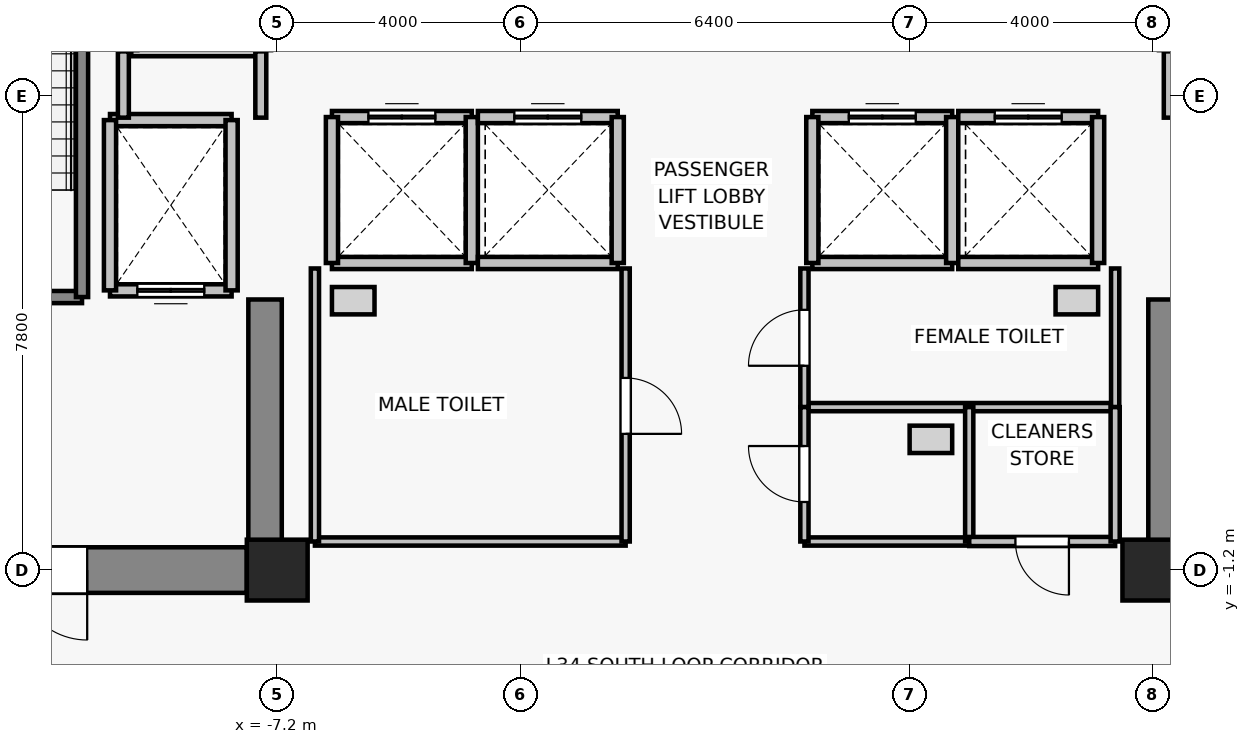
"""IFC4 building model, lengths in metres.
Left out: names, types, materials, properties, quantities, classifications, styles, units other than length and angle.
Written with IfcOpenShell. Run it as: python <this file> out.ifc"""

import sys

from ifc_helpers import new_model, si_unit, direction, frame, frame_2d, origin, origin_2d, place, context, subcontext, project, spatial, rectangle, extrude, source, transform, mapped, element, fill, save


model = new_model("IFC4")
c1 = context("Model", 3, precision=1e-05, world=origin(), true_north=direction((0.0, 1.0)))
c2 = subcontext(c1, "Body", "Model", "MODEL_VIEW")
j1 = project(units=[si_unit("LENGTHUNIT", "METRE"), si_unit("PLANEANGLEUNIT", "RADIAN")], contexts=[c1])
p1 = place(None, origin())
s1 = spatial("IfcSite", under=j1, at=p1, CompositionType="ELEMENT")
p2 = place(p1, origin())
s2 = spatial("IfcBuilding", under=s1, at=p2, CompositionType="ELEMENT")
p3 = place(p2, frame((0.0, 0.0, 123.1)))
s3 = spatial("IfcBuildingStorey", under=s2, at=p3, CompositionType="ELEMENT", Elevation=123.1)
for number, where, z_axis, x_axis in (
    (1, (-7.2, -1.2, 0.0), (0.0, 0.0, 1.0), (1.0, 0.0, 0.0)),
    (2, (7.2, -1.2, 0.0), (0.0, 0.0, 1.0), (1.0, 0.0, 0.0)),
):
    element("IfcColumn", number, at=place(p3, frame(where, z_axis=z_axis, x_axis=x_axis)), inside=s3, PredefinedType="COLUMN", context=c2, shape_type="SweptSolid", body=[
        extrude(rectangle(XDim=1.0, YDim=1.0, at=origin_2d()), origin(), (0.0, 0.0, 1.0), 3.3),
    ])
p4 = place(p3, frame((-7.7, -1.2, 0.0), z_axis=(0.0, 0.0, 1.0), x_axis=(-1.0, 0.0, 0.0)))
e3 = element("IfcWall", 3, at=p4, inside=s3, PredefinedType="SHEAR", context=c2, shape_type="SweptSolid", body=[
    extrude(rectangle(XDim=6.2, YDim=0.75, at=frame_2d((3.1, 0.0))), origin(), (0.0, 0.0, 1.0), 3.075),
])
p5 = place(p4, frame((2.625, 0.0, 0.0)))
e4 = element("IfcOpeningElement", 4, at=p5, cuts=e3, PredefinedType="OPENING", context=c2, shape_type="SweptSolid", body=[
    extrude(rectangle(XDim=1.15, YDim=2.15, at=frame_2d((0.575, 1.075))), frame((0.0, 0.385, 0.0), z_axis=(0.0, -1.0, 0.0), x_axis=(1.0, 0.0, 0.0)), (0.0, 0.0, 1.0), 0.77),
])
for number, where, z_axis, x_axis in (
    (5, (-7.4, -0.825, 0.0), (0.0, 0.0, 1.0), (0.0, 1.0, 0.0)),
    (6, (7.4, -0.825, 0.0), (0.0, 0.0, 1.0), (0.0, 1.0, 0.0)),
):
    element("IfcWall", number, at=place(p3, frame(where, z_axis=z_axis, x_axis=x_axis)), inside=s3, PredefinedType="SHEAR", context=c2, shape_type="SweptSolid", body=[
        extrude(rectangle(XDim=4.075, YDim=0.55, at=frame_2d((2.038, 0.0))), origin(), (0.0, 0.0, 1.0), 3.075),
    ])
p6 = place(p3, frame((-7.95, 3.4, 0.0), z_axis=(0.0, 0.0, 1.0), x_axis=(-1.0, 0.0, 0.0)))
e7 = element("IfcWall", 7, at=p6, inside=s3, PredefinedType="SOLIDWALL", context=c2, shape_type="SweptSolid", body=[
    extrude(rectangle(XDim=2.0, YDim=0.2, at=frame_2d((1.0, 0.0))), origin(), (0.0, 0.0, 1.0), 3.075),
])
p7 = place(p6, frame((0.45, 0.0, 0.0)))
e8 = element("IfcOpeningElement", 8, at=p7, cuts=e7, PredefinedType="OPENING", context=c2, shape_type="SweptSolid", body=[
    extrude(rectangle(XDim=1.1, YDim=2.2, at=frame_2d((0.55, 1.1))), frame((0.0, 0.11, 0.0), z_axis=(0.0, -1.0, 0.0), x_axis=(1.0, 0.0, 0.0)), (0.0, 0.0, 1.0), 0.22),
])
p8 = place(p3, frame((-9.95, 6.2, 0.0), z_axis=(0.0, 0.0, 1.0), x_axis=(1.0, 0.0, 0.0)))
e9 = element("IfcWall", 9, at=p8, inside=s3, PredefinedType="SOLIDWALL", context=c2, shape_type="SweptSolid", body=[
    extrude(rectangle(XDim=2.0, YDim=0.2, at=frame_2d((1.0, 0.0))), origin(), (0.0, 0.0, 1.0), 3.075),
])
for number, where, z_axis, x_axis in (
    (10, (-9.95, 3.4, 0.0), (0.0, 0.0, 1.0), (0.0, 1.0, 0.0)),
    (11, (-7.95, 6.2, 0.0), (0.0, 0.0, 1.0), (0.0, -1.0, 0.0)),
):
    element("IfcWall", number, at=place(p3, frame(where, z_axis=z_axis, x_axis=x_axis)), inside=s3, PredefinedType="SOLIDWALL", context=c2, shape_type="SweptSolid", body=[
        extrude(rectangle(XDim=2.8, YDim=0.2, at=frame_2d((1.4, 0.0))), origin(), (0.0, 0.0, 1.0), 3.075),
    ])
p9 = place(p3, frame((-4.0, 3.85, 0.0), z_axis=(0.0, 0.0, 1.0), x_axis=(-1.0, 0.0, 0.0)))
e12 = element("IfcWall", 12, at=p9, inside=s3, PredefinedType="SOLIDWALL", context=c2, shape_type="SweptSolid", body=[
    extrude(rectangle(XDim=2.3, YDim=0.2, at=frame_2d((1.15, 0.0))), origin(), (0.0, 0.0, 1.0), 3.075),
])
p10 = place(p3, frame((-6.3, 6.25, 0.0), z_axis=(0.0, 0.0, 1.0), x_axis=(1.0, 0.0, 0.0)))
e13 = element("IfcWall", 13, at=p10, inside=s3, PredefinedType="SOLIDWALL", context=c2, shape_type="SweptSolid", body=[
    extrude(rectangle(XDim=2.3, YDim=0.2, at=frame_2d((1.15, 0.0))), origin(), (0.0, 0.0, 1.0), 3.075),
])
p11 = place(p10, frame((0.6, 0.0, 0.0)))
e14 = element("IfcOpeningElement", 14, at=p11, cuts=e13, PredefinedType="OPENING", context=c2, shape_type="SweptSolid", body=[
    extrude(rectangle(XDim=1.1, YDim=2.2, at=frame_2d((0.55, 1.1))), frame((0.0, 0.11, 0.0), z_axis=(0.0, -1.0, 0.0), x_axis=(1.0, 0.0, 0.0)), (0.0, 0.0, 1.0), 0.22),
])
for number, where, z_axis, x_axis in (
    (15, (-6.3, 3.85, 0.0), (0.0, 0.0, 1.0), (0.0, 1.0, 0.0)),
    (16, (-4.0, 6.25, 0.0), (0.0, 0.0, 1.0), (0.0, -1.0, 0.0)),
):
    element("IfcWall", number, at=place(p3, frame(where, z_axis=z_axis, x_axis=x_axis)), inside=s3, PredefinedType="SOLIDWALL", context=c2, shape_type="SweptSolid", body=[
        extrude(rectangle(XDim=2.4, YDim=0.2, at=frame_2d((1.2, 0.0))), origin(), (0.0, 0.0, 1.0), 3.075),
    ])
p12 = place(p3, frame((-1.6, 3.85, 0.0), z_axis=(0.0, 0.0, 1.0), x_axis=(-1.0, 0.0, 0.0)))
e17 = element("IfcWall", 17, at=p12, inside=s3, PredefinedType="SOLIDWALL", context=c2, shape_type="SweptSolid", body=[
    extrude(rectangle(XDim=2.3, YDim=0.2, at=frame_2d((1.15, 0.0))), origin(), (0.0, 0.0, 1.0), 3.075),
])
p13 = place(p3, frame((-3.9, 6.25, 0.0), z_axis=(0.0, 0.0, 1.0), x_axis=(1.0, 0.0, 0.0)))
e18 = element("IfcWall", 18, at=p13, inside=s3, PredefinedType="SOLIDWALL", context=c2, shape_type="SweptSolid", body=[
    extrude(rectangle(XDim=2.3, YDim=0.2, at=frame_2d((1.15, 0.0))), origin(), (0.0, 0.0, 1.0), 3.075),
])
p14 = place(p13, frame((0.6, 0.0, 0.0)))
e19 = element("IfcOpeningElement", 19, at=p14, cuts=e18, PredefinedType="OPENING", context=c2, shape_type="SweptSolid", body=[
    extrude(rectangle(XDim=1.1, YDim=2.2, at=frame_2d((0.55, 1.1))), frame((0.0, 0.11, 0.0), z_axis=(0.0, -1.0, 0.0), x_axis=(1.0, 0.0, 0.0)), (0.0, 0.0, 1.0), 0.22),
])
p15 = place(p3, frame((-1.6, 6.25, 0.0), z_axis=(0.0, 0.0, 1.0), x_axis=(0.0, -1.0, 0.0)))
e20 = element("IfcWall", 20, at=p15, inside=s3, PredefinedType="SOLIDWALL", context=c2, shape_type="SweptSolid", body=[
    extrude(rectangle(XDim=2.4, YDim=0.2, at=frame_2d((1.2, 0.0))), origin(), (0.0, 0.0, 1.0), 3.075),
])
p16 = place(p3, frame((3.9, 3.85, 0.0), z_axis=(0.0, 0.0, 1.0), x_axis=(-1.0, 0.0, 0.0)))
e21 = element("IfcWall", 21, at=p16, inside=s3, PredefinedType="SOLIDWALL", context=c2, shape_type="SweptSolid", body=[
    extrude(rectangle(XDim=2.3, YDim=0.2, at=frame_2d((1.15, 0.0))), origin(), (0.0, 0.0, 1.0), 3.075),
])
p17 = place(p3, frame((1.6, 6.25, 0.0), z_axis=(0.0, 0.0, 1.0), x_axis=(1.0, 0.0, 0.0)))
e22 = element("IfcWall", 22, at=p17, inside=s3, PredefinedType="SOLIDWALL", context=c2, shape_type="SweptSolid", body=[
    extrude(rectangle(XDim=2.3, YDim=0.2, at=frame_2d((1.15, 0.0))), origin(), (0.0, 0.0, 1.0), 3.075),
])
p18 = place(p17, frame((0.6, 0.0, 0.0)))
e23 = element("IfcOpeningElement", 23, at=p18, cuts=e22, PredefinedType="OPENING", context=c2, shape_type="SweptSolid", body=[
    extrude(rectangle(XDim=1.1, YDim=2.2, at=frame_2d((0.55, 1.1))), frame((0.0, 0.11, 0.0), z_axis=(0.0, -1.0, 0.0), x_axis=(1.0, 0.0, 0.0)), (0.0, 0.0, 1.0), 0.22),
])
for number, where, z_axis, x_axis in (
    (24, (1.6, 3.85, 0.0), (0.0, 0.0, 1.0), (0.0, 1.0, 0.0)),
    (25, (3.9, 6.25, 0.0), (0.0, 0.0, 1.0), (0.0, -1.0, 0.0)),
):
    element("IfcWall", number, at=place(p3, frame(where, z_axis=z_axis, x_axis=x_axis)), inside=s3, PredefinedType="SOLIDWALL", context=c2, shape_type="SweptSolid", body=[
        extrude(rectangle(XDim=2.4, YDim=0.2, at=frame_2d((1.2, 0.0))), origin(), (0.0, 0.0, 1.0), 3.075),
    ])
p19 = place(p3, frame((6.3, 3.85, 0.0), z_axis=(0.0, 0.0, 1.0), x_axis=(-1.0, 0.0, 0.0)))
e26 = element("IfcWall", 26, at=p19, inside=s3, PredefinedType="SOLIDWALL", context=c2, shape_type="SweptSolid", body=[
    extrude(rectangle(XDim=2.3, YDim=0.2, at=frame_2d((1.15, 0.0))), origin(), (0.0, 0.0, 1.0), 3.075),
])
p20 = place(p3, frame((4.0, 6.25, 0.0), z_axis=(0.0, 0.0, 1.0), x_axis=(1.0, 0.0, 0.0)))
e27 = element("IfcWall", 27, at=p20, inside=s3, PredefinedType="SOLIDWALL", context=c2, shape_type="SweptSolid", body=[
    extrude(rectangle(XDim=2.3, YDim=0.2, at=frame_2d((1.15, 0.0))), origin(), (0.0, 0.0, 1.0), 3.075),
])
p21 = place(p20, frame((0.6, 0.0, 0.0)))
e28 = element("IfcOpeningElement", 28, at=p21, cuts=e27, PredefinedType="OPENING", context=c2, shape_type="SweptSolid", body=[
    extrude(rectangle(XDim=1.1, YDim=2.2, at=frame_2d((0.55, 1.1))), frame((0.0, 0.11, 0.0), z_axis=(0.0, -1.0, 0.0), x_axis=(1.0, 0.0, 0.0)), (0.0, 0.0, 1.0), 0.22),
])
p22 = place(p3, frame((6.3, 6.25, 0.0), z_axis=(0.0, 0.0, 1.0), x_axis=(0.0, -1.0, 0.0)))
e29 = element("IfcWall", 29, at=p22, inside=s3, PredefinedType="SOLIDWALL", context=c2, shape_type="SweptSolid", body=[
    extrude(rectangle(XDim=2.4, YDim=0.2, at=frame_2d((1.2, 0.0))), origin(), (0.0, 0.0, 1.0), 3.075),
])
for number, where, z_axis, x_axis in (
    (30, (-7.4, 7.35, 0.0), (0.0, 0.0, 1.0), (-1.0, 0.0, 0.0)),
    (31, (9.6, 7.35, 0.0), (0.0, 0.0, 1.0), (-1.0, 0.0, 0.0)),
):
    element("IfcWall", number, at=place(p3, frame(where, z_axis=z_axis, x_axis=x_axis)), inside=s3, PredefinedType="SOLIDWALL", context=c2, shape_type="SweptSolid", body=[
        extrude(rectangle(XDim=2.2, YDim=0.2, at=frame_2d((1.1, 0.0))), origin(), (0.0, 0.0, 1.0), 2.515),
    ])
p23 = place(p3, frame((-10.41, 3.29, 0.0), z_axis=(0.0, 0.0, 1.0), x_axis=(-1.0, 0.0, 0.0)))
e32 = element("IfcWall", 32, at=p23, inside=s3, PredefinedType="SOLIDWALL", context=c2, shape_type="SweptSolid", body=[
    extrude(rectangle(XDim=3.52, YDim=0.2, at=frame_2d((1.76, 0.0))), origin(), (0.0, 0.0, 1.0), 3.075),
])
p24 = place(p23, frame((1.165, 0.0, 0.0)))
e33 = element("IfcOpeningElement", 33, at=p24, cuts=e32, PredefinedType="OPENING", context=c2, shape_type="SweptSolid", body=[
    extrude(rectangle(XDim=1.15, YDim=2.15, at=frame_2d((0.575, 1.075))), frame((0.0, 0.11, 0.0), z_axis=(0.0, -1.0, 0.0), x_axis=(1.0, 0.0, 0.0)), (0.0, 0.0, 1.0), 0.22),
])
p25 = place(p3, frame((-10.41, 12.13, 0.0), z_axis=(0.0, 0.0, 1.0), x_axis=(0.0, -1.0, 0.0)))
e34 = element("IfcWall", 34, at=p25, inside=s3, PredefinedType="SOLIDWALL", context=c2, shape_type="SweptSolid", body=[
    extrude(rectangle(XDim=8.84, YDim=0.2, at=frame_2d((4.42, 0.0))), origin(), (0.0, 0.0, 1.0), 3.075),
])
p26 = place(p3, frame((-9.73, 6.24, 0.0), z_axis=(0.0, 0.0, 1.0), x_axis=(0.0, 1.0, 0.0)))
e35 = element("IfcWall", 35, at=p26, inside=s3, PredefinedType="PARTITIONING", context=c2, shape_type="SweptSolid", body=[
    extrude(rectangle(XDim=1.09, YDim=0.18, at=frame_2d((0.545, 0.0))), origin(), (0.0, 0.0, 1.0), 3.075),
])
for number, where, z_axis, x_axis in (
    (36, (-7.47, 7.33, 0.0), (0.0, 0.0, 1.0), (0.0, -1.0, 0.0)),
    (37, (7.47, 6.24, 0.0), (0.0, 0.0, 1.0), (0.0, 1.0, 0.0)),
):
    element("IfcWall", number, at=place(p3, frame(where, z_axis=z_axis, x_axis=x_axis)), inside=s3, PredefinedType="PARTITIONING", context=c2, shape_type="SweptSolid", body=[
        extrude(rectangle(XDim=1.09, YDim=0.18, at=frame_2d((0.545, 0.0))), origin(), (0.0, 0.0, 1.0), 2.515),
    ])
p27 = place(p3, frame((-1.47, -0.73, 0.0), z_axis=(0.0, 0.0, 1.0), x_axis=(-1.0, 0.0, 0.0)))
e38 = element("IfcWall", 38, at=p27, inside=s3, PredefinedType="PARTITIONING", context=c2, shape_type="SweptSolid", body=[
    extrude(rectangle(XDim=5.11, YDim=0.135, at=frame_2d((2.555, 0.0))), origin(), (0.0, 0.0, 1.0), 3.075),
])
p28 = place(p3, frame((-6.58, -0.73, 0.0), z_axis=(0.0, 0.0, 1.0), x_axis=(0.0, 1.0, 0.0)))
e39 = element("IfcWall", 39, at=p28, inside=s3, PredefinedType="PARTITIONING", context=c2, shape_type="SweptSolid", body=[
    extrude(rectangle(XDim=4.49, YDim=0.135, at=frame_2d((2.245, 0.0))), origin(), (0.0, 0.0, 1.0), 3.075),
])
p29 = place(p3, frame((-1.47, 3.76, 0.0), z_axis=(0.0, 0.0, 1.0), x_axis=(0.0, -1.0, 0.0)))
e40 = element("IfcWall", 40, at=p29, inside=s3, PredefinedType="PARTITIONING", context=c2, shape_type="SweptSolid", body=[
    extrude(rectangle(XDim=4.49, YDim=0.135, at=frame_2d((2.245, 0.0))), origin(), (0.0, 0.0, 1.0), 3.075),
])
p30 = place(p29, frame((1.8, 0.0, 0.0)))
e41 = element("IfcOpeningElement", 41, at=p30, cuts=e40, PredefinedType="OPENING", context=c2, shape_type="SweptSolid", body=[
    extrude(rectangle(XDim=0.92, YDim=2.1, at=frame_2d((0.46, 1.05))), frame((0.0, 0.077, 0.0), z_axis=(0.0, -1.0, 0.0), x_axis=(1.0, 0.0, 0.0)), (0.0, 0.0, 1.0), 0.155),
])
p31 = place(p3, frame((6.58, 1.48, 0.0), z_axis=(0.0, 0.0, 1.0), x_axis=(-1.0, 0.0, 0.0)))
e42 = element("IfcWall", 42, at=p31, inside=s3, PredefinedType="PARTITIONING", context=c2, shape_type="SweptSolid", body=[
    extrude(rectangle(XDim=5.11, YDim=0.135, at=frame_2d((2.555, 0.0))), origin(), (0.0, 0.0, 1.0), 3.075),
])
p32 = place(p3, frame((1.47, 1.48, 0.0), z_axis=(0.0, 0.0, 1.0), x_axis=(0.0, 1.0, 0.0)))
e43 = element("IfcWall", 43, at=p32, inside=s3, PredefinedType="PARTITIONING", context=c2, shape_type="SweptSolid", body=[
    extrude(rectangle(XDim=2.28, YDim=0.135, at=frame_2d((1.14, 0.0))), origin(), (0.0, 0.0, 1.0), 3.075),
])
p33 = place(p32, frame((0.68, 0.0, 0.0)))
e44 = element("IfcOpeningElement", 44, at=p33, cuts=e43, PredefinedType="OPENING", context=c2, shape_type="SweptSolid", body=[
    extrude(rectangle(XDim=0.92, YDim=2.1, at=frame_2d((0.46, 1.05))), frame((0.0, 0.077, 0.0), z_axis=(0.0, -1.0, 0.0), x_axis=(1.0, 0.0, 0.0)), (0.0, 0.0, 1.0), 0.155),
])
p34 = place(p3, frame((6.58, 3.76, 0.0), z_axis=(0.0, 0.0, 1.0), x_axis=(0.0, -1.0, 0.0)))
e45 = element("IfcWall", 45, at=p34, inside=s3, PredefinedType="PARTITIONING", context=c2, shape_type="SweptSolid", body=[
    extrude(rectangle(XDim=2.28, YDim=0.135, at=frame_2d((1.14, 0.0))), origin(), (0.0, 0.0, 1.0), 3.075),
])
p35 = place(p3, frame((4.18, -0.73, 0.0), z_axis=(0.0, 0.0, 1.0), x_axis=(-1.0, 0.0, 0.0)))
e46 = element("IfcWall", 46, at=p35, inside=s3, PredefinedType="PARTITIONING", context=c2, shape_type="SweptSolid", body=[
    extrude(rectangle(XDim=2.71, YDim=0.135, at=frame_2d((1.355, 0.0))), origin(), (0.0, 0.0, 1.0), 3.075),
])
p36 = place(p3, frame((1.47, -0.73, 0.0), z_axis=(0.0, 0.0, 1.0), x_axis=(0.0, 1.0, 0.0)))
e47 = element("IfcWall", 47, at=p36, inside=s3, PredefinedType="PARTITIONING", context=c2, shape_type="SweptSolid", body=[
    extrude(rectangle(XDim=2.21, YDim=0.135, at=frame_2d((1.105, 0.0))), origin(), (0.0, 0.0, 1.0), 3.075),
])
p37 = place(p36, frame((0.65, 0.0, 0.0)))
e48 = element("IfcOpeningElement", 48, at=p37, cuts=e47, PredefinedType="OPENING", context=c2, shape_type="SweptSolid", body=[
    extrude(rectangle(XDim=0.92, YDim=2.1, at=frame_2d((0.46, 1.05))), frame((0.0, 0.077, 0.0), z_axis=(0.0, -1.0, 0.0), x_axis=(1.0, 0.0, 0.0)), (0.0, 0.0, 1.0), 0.155),
])
p38 = place(p3, frame((4.18, 1.48, 0.0), z_axis=(0.0, 0.0, 1.0), x_axis=(0.0, -1.0, 0.0)))
e49 = element("IfcWall", 49, at=p38, inside=s3, PredefinedType="PARTITIONING", context=c2, shape_type="SweptSolid", body=[
    extrude(rectangle(XDim=2.21, YDim=0.135, at=frame_2d((1.105, 0.0))), origin(), (0.0, 0.0, 1.0), 3.075),
])
p39 = place(p3, frame((6.58, -0.73, 0.0), z_axis=(0.0, 0.0, 1.0), x_axis=(-1.0, 0.0, 0.0)))
e50 = element("IfcWall", 50, at=p39, inside=s3, PredefinedType="PARTITIONING", context=c2, shape_type="SweptSolid", body=[
    extrude(rectangle(XDim=2.4, YDim=0.15, at=frame_2d((1.2, 0.0))), origin(), (0.0, 0.0, 1.0), 3.075),
])
p40 = place(p39, frame((0.76, 0.0, 0.0)))
e51 = element("IfcOpeningElement", 51, at=p40, cuts=e50, PredefinedType="OPENING", context=c2, shape_type="SweptSolid", body=[
    extrude(rectangle(XDim=0.88, YDim=2.1, at=frame_2d((0.44, 1.05))), frame((0.0, 0.085, 0.0), z_axis=(0.0, -1.0, 0.0), x_axis=(1.0, 0.0, 0.0)), (0.0, 0.0, 1.0), 0.17),
])
p41 = place(p3, frame((6.58, 1.48, 0.0), z_axis=(0.0, 0.0, 1.0), x_axis=(0.0, -1.0, 0.0)))
e52 = element("IfcWall", 52, at=p41, inside=s3, PredefinedType="PARTITIONING", context=c2, shape_type="SweptSolid", body=[
    extrude(rectangle(XDim=2.21, YDim=0.15, at=frame_2d((1.105, 0.0))), origin(), (0.0, 0.0, 1.0), 3.075),
])
m1 = source(origin(), c2, "Body", "SweptSolid", [
    extrude(rectangle(XDim=1.1, YDim=2.2, at=frame_2d((0.55, 1.1))), frame((0.0, 0.025, 0.0), z_axis=(0.0, -1.0, 0.0), x_axis=(1.0, 0.0, 0.0)), (0.0, 0.0, 1.0), 0.05),
])
p42 = place(p7, origin())
e53 = element("IfcDoor", 53, at=p42, inside=s3, OperationType="DOUBLE_DOOR_SLIDING", PredefinedType="DOOR", context=c2, shape_type="MappedRepresentation", body=[
    mapped(m1, transform((0.0, 0.0, 0.0), x_axis=(1.0, 0.0, 0.0), y_axis=(0.0, 1.0, 0.0), z_axis=(0.0, 0.0, 1.0), scale=1.0)),
])
fill(e8, e53)
p43 = place(p11, origin())
e54 = element("IfcDoor", 54, at=p43, inside=s3, OperationType="DOUBLE_DOOR_SLIDING", PredefinedType="DOOR", context=c2, shape_type="MappedRepresentation", body=[
    mapped(m1, transform((0.0, 0.0, 0.0), x_axis=(1.0, 0.0, 0.0), y_axis=(0.0, 1.0, 0.0), z_axis=(0.0, 0.0, 1.0), scale=1.0)),
])
fill(e14, e54)
p44 = place(p14, origin())
e55 = element("IfcDoor", 55, at=p44, inside=s3, OperationType="DOUBLE_DOOR_SLIDING", PredefinedType="DOOR", context=c2, shape_type="MappedRepresentation", body=[
    mapped(m1, transform((0.0, 0.0, 0.0), x_axis=(1.0, 0.0, 0.0), y_axis=(0.0, 1.0, 0.0), z_axis=(0.0, 0.0, 1.0), scale=1.0)),
])
fill(e19, e55)
p45 = place(p18, origin())
e56 = element("IfcDoor", 56, at=p45, inside=s3, OperationType="DOUBLE_DOOR_SLIDING", PredefinedType="DOOR", context=c2, shape_type="MappedRepresentation", body=[
    mapped(m1, transform((0.0, 0.0, 0.0), x_axis=(1.0, 0.0, 0.0), y_axis=(0.0, 1.0, 0.0), z_axis=(0.0, 0.0, 1.0), scale=1.0)),
])
fill(e23, e56)
p46 = place(p21, origin())
e57 = element("IfcDoor", 57, at=p46, inside=s3, OperationType="DOUBLE_DOOR_SLIDING", PredefinedType="DOOR", context=c2, shape_type="MappedRepresentation", body=[
    mapped(m1, transform((0.0, 0.0, 0.0), x_axis=(1.0, 0.0, 0.0), y_axis=(0.0, 1.0, 0.0), z_axis=(0.0, 0.0, 1.0), scale=1.0)),
])
fill(e28, e57)
m2 = source(origin(), c2, "Body", "SweptSolid", [
    extrude(rectangle(XDim=1.15, YDim=2.15, at=frame_2d((0.575, 1.075))), frame((0.0, 0.025, 0.0), z_axis=(0.0, -1.0, 0.0), x_axis=(1.0, 0.0, 0.0)), (0.0, 0.0, 1.0), 0.05),
])
p47 = place(p5, origin())
e58 = element("IfcDoor", 58, at=p47, inside=s3, OperationType="SINGLE_SWING_LEFT", PredefinedType="DOOR", context=c2, shape_type="MappedRepresentation", body=[
    mapped(m2, transform((0.0, 0.0, 0.0), x_axis=(1.0, 0.0, 0.0), y_axis=(0.0, 1.0, 0.0), z_axis=(0.0, 0.0, 1.0), scale=1.0)),
])
fill(e4, e58)
m3 = source(origin(), c2, "Body", "SweptSolid", [
    extrude(rectangle(XDim=0.92, YDim=2.1, at=frame_2d((0.46, 1.05))), frame((0.0, 0.025, 0.0), z_axis=(0.0, -1.0, 0.0), x_axis=(1.0, 0.0, 0.0)), (0.0, 0.0, 1.0), 0.05),
])
p48 = place(p30, origin())
e59 = element("IfcDoor", 59, at=p48, inside=s3, OperationType="SINGLE_SWING_RIGHT", PredefinedType="DOOR", context=c2, shape_type="MappedRepresentation", body=[
    mapped(m3, transform((0.0, 0.0, 0.0), x_axis=(1.0, 0.0, 0.0), y_axis=(0.0, 1.0, 0.0), z_axis=(0.0, 0.0, 1.0), scale=1.0)),
])
fill(e41, e59)
p49 = place(p33, origin())
e60 = element("IfcDoor", 60, at=p49, inside=s3, OperationType="SINGLE_SWING_LEFT", PredefinedType="DOOR", context=c2, shape_type="MappedRepresentation", body=[
    mapped(m3, transform((0.0, 0.0, 0.0), x_axis=(1.0, 0.0, 0.0), y_axis=(0.0, 1.0, 0.0), z_axis=(0.0, 0.0, 1.0), scale=1.0)),
])
fill(e44, e60)
p50 = place(p37, origin())
e61 = element("IfcDoor", 61, at=p50, inside=s3, OperationType="SINGLE_SWING_RIGHT", PredefinedType="DOOR", context=c2, shape_type="MappedRepresentation", body=[
    mapped(m3, transform((0.0, 0.0, 0.0), x_axis=(1.0, 0.0, 0.0), y_axis=(0.0, 1.0, 0.0), z_axis=(0.0, 0.0, 1.0), scale=1.0)),
])
fill(e48, e61)
m4 = source(origin(), c2, "Body", "SweptSolid", [
    extrude(rectangle(XDim=0.88, YDim=2.1, at=frame_2d((0.44, 1.05))), frame((0.0, 0.025, 0.0), z_axis=(0.0, -1.0, 0.0), x_axis=(1.0, 0.0, 0.0)), (0.0, 0.0, 1.0), 0.05),
])
p51 = place(p40, origin())
e62 = element("IfcDoor", 62, at=p51, inside=s3, OperationType="SINGLE_SWING_LEFT", PredefinedType="DOOR", context=c2, shape_type="MappedRepresentation", body=[
    mapped(m4, transform((0.0, 0.0, 0.0), x_axis=(1.0, 0.0, 0.0), y_axis=(0.0, 1.0, 0.0), z_axis=(0.0, 0.0, 1.0), scale=1.0)),
])
fill(e51, e62)
save(model, sys.argv[1])
